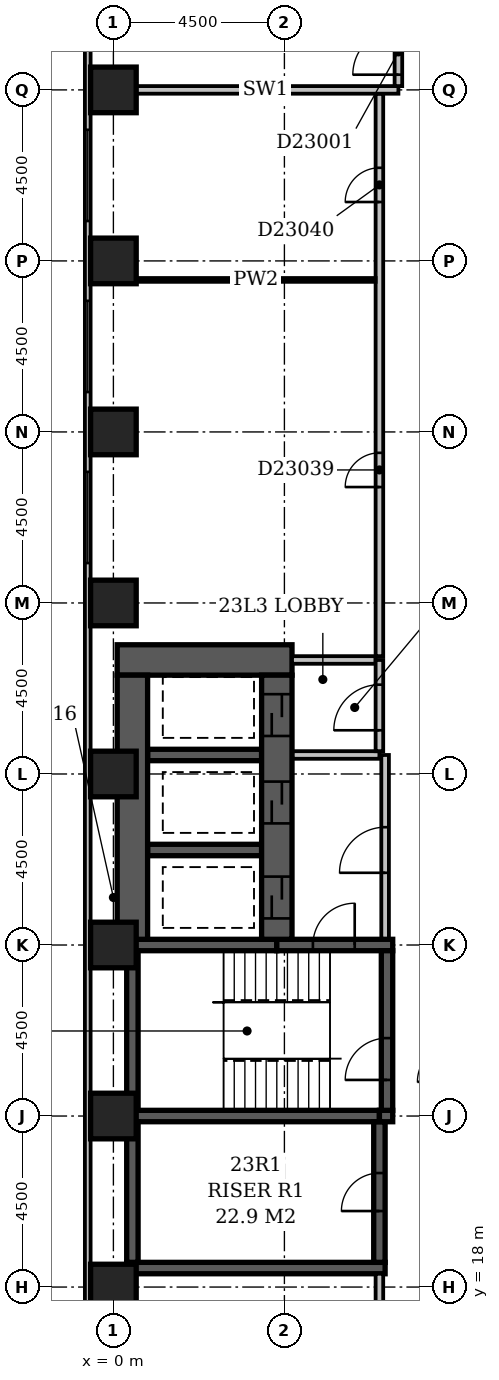
"""IFC4 building model, lengths in metres.
Left out: names, types, materials, properties, quantities, classifications, styles, units other than length and angle.
Written with IfcOpenShell. Run it as: python <this file> out.ifc"""

import sys

from ifc_helpers import new_model, si_unit, direction, frame, frame_2d, origin, origin_2d, place, context, subcontext, project, spatial, rectangle, extrude, element, fill, save


model = new_model("IFC4")
c1 = context("Model", 3, precision=1e-05, world=origin(), true_north=direction((0.0, 1.0)))
c2 = subcontext(c1, "Body", "Model", "MODEL_VIEW")
j1 = project(units=[si_unit("LENGTHUNIT", "METRE"), si_unit("PLANEANGLEUNIT", "RADIAN")], contexts=[c1])
p1 = place(None, origin())
s1 = spatial("IfcSite", under=j1, at=p1, CompositionType="ELEMENT")
p2 = place(p1, origin())
s2 = spatial("IfcBuilding", under=s1, at=p2, CompositionType="ELEMENT")
p3 = place(p2, frame((0.0, 0.0, 93.8)))
s3 = spatial("IfcBuildingStorey", under=s2, at=p3, CompositionType="ELEMENT", Elevation=93.8)
p4 = place(p3, frame((0.1, 34.5, -0.3), z_axis=(0.0, 0.0, 1.0), x_axis=(1.0, 0.0, 0.0)))
e1 = element("IfcWall", 1, at=p4, inside=s3, PredefinedType="SHEAR", context=c2, shape_type="SweptSolid", body=[
    extrude(rectangle(XDim=4.6, YDim=0.8, at=frame_2d((2.3, 0.0))), origin(), (0.0, 0.0, 1.0), 3.6),
])
p5 = place(p3, frame((0.35, 18.5, -0.3), z_axis=(0.0, 0.0, 1.0), x_axis=(1.0, 0.0, 0.0)))
e2 = element("IfcWall", 2, at=p5, inside=s3, PredefinedType="SHEAR", context=c2, shape_type="SweptSolid", body=[
    extrude(rectangle(XDim=6.8, YDim=0.3, at=frame_2d((3.4, 0.0))), origin(), (0.0, 0.0, 1.0), 3.6),
])
p6 = place(p3, frame((0.35, 22.5, -0.3), z_axis=(0.0, 0.0, 1.0), x_axis=(1.0, 0.0, 0.0)))
e3 = element("IfcWall", 3, at=p6, inside=s3, PredefinedType="SHEAR", context=c2, shape_type="SweptSolid", body=[
    extrude(rectangle(XDim=6.65, YDim=0.3, at=frame_2d((3.325, 0.0))), origin(), (0.0, 0.0, 1.0), 3.6),
])
p7 = place(p3, frame((0.35, 27.0, -0.3), z_axis=(0.0, 0.0, 1.0), x_axis=(1.0, 0.0, 0.0)))
e4 = element("IfcWall", 4, at=p7, inside=s3, PredefinedType="SHEAR", context=c2, shape_type="SweptSolid", body=[
    extrude(rectangle(XDim=3.95, YDim=0.3, at=frame_2d((1.975, 0.0))), origin(), (0.0, 0.0, 1.0), 3.6),
])
p8 = place(p3, frame((0.5, 18.65, -0.3), z_axis=(0.0, 0.0, 1.0), x_axis=(0.0, 1.0, 0.0)))
e5 = element("IfcWall", 5, at=p8, inside=s3, PredefinedType="SHEAR", context=c2, shape_type="SweptSolid", body=[
    extrude(rectangle(XDim=3.7, YDim=0.3, at=frame_2d((1.85, 0.0))), origin(), (0.0, 0.0, 1.0), 3.6),
])
p9 = place(p3, frame((0.5, 22.65, -0.3), z_axis=(0.0, 0.0, 1.0), x_axis=(0.0, 1.0, 0.0)))
e6 = element("IfcWall", 6, at=p9, inside=s3, PredefinedType="SHEAR", context=c2, shape_type="SweptSolid", body=[
    extrude(rectangle(XDim=4.2, YDim=0.3, at=frame_2d((2.1, 0.0))), origin(), (0.0, 0.0, 1.0), 3.6),
])
p10 = place(p3, frame((0.5, 27.15, -0.3), z_axis=(0.0, 0.0, 1.0), x_axis=(0.0, 1.0, 0.0)))
e7 = element("IfcWall", 7, at=p10, inside=s3, PredefinedType="SHEAR", context=c2, shape_type="SweptSolid", body=[
    extrude(rectangle(XDim=6.95, YDim=0.8, at=frame_2d((3.475, 0.0))), origin(), (0.0, 0.0, 1.0), 3.6),
])
for number, where, z_axis, x_axis in (
    (8, (0.9, 29.5, -0.3), (0.0, 0.0, 1.0), (1.0, 0.0, 0.0)),
    (9, (0.9, 32.0, -0.3), (0.0, 0.0, 1.0), (1.0, 0.0, 0.0)),
):
    element("IfcWall", number, at=place(p3, frame(where, z_axis=z_axis, x_axis=x_axis)), inside=s3, PredefinedType="SHEAR", context=c2, shape_type="SweptSolid", body=[
        extrude(rectangle(XDim=3.0, YDim=0.3, at=frame_2d((1.5, 0.0))), origin(), (0.0, 0.0, 1.0), 3.6),
    ])
p11 = place(p3, frame((4.3, 27.0, -0.3), z_axis=(0.0, 0.0, 1.0), x_axis=(1.0, 0.0, 0.0)))
e10 = element("IfcWall", 10, at=p11, inside=s3, PredefinedType="SHEAR", context=c2, shape_type="SweptSolid", body=[
    extrude(rectangle(XDim=3.05, YDim=0.3, at=frame_2d((1.525, 0.0))), origin(), (0.0, 0.0, 1.0), 3.6),
])
p12 = place(p11, frame((0.95, 0.0, 0.3)))
e11 = element("IfcOpeningElement", 11, at=p12, cuts=e10, PredefinedType="OPENING", context=c2, shape_type="SweptSolid", body=[
    extrude(rectangle(XDim=1.1, YDim=2.1, at=frame_2d((0.55, 1.05))), frame((0.0, 0.162, 0.0), z_axis=(0.0, -1.0, 0.0), x_axis=(1.0, 0.0, 0.0)), (0.0, 0.0, 1.0), 0.324),
])
p13 = place(p3, frame((4.3, 27.15, -0.3), z_axis=(0.0, 0.0, 1.0), x_axis=(0.0, 1.0, 0.0)))
e12 = element("IfcWall", 12, at=p13, inside=s3, PredefinedType="SHEAR", context=c2, shape_type="SweptSolid", body=[
    extrude(rectangle(XDim=6.95, YDim=0.8, at=frame_2d((3.475, 0.0))), origin(), (0.0, 0.0, 1.0), 3.6),
])
p14 = place(p13, frame((3.05, 0.0, 0.3)))
e13 = element("IfcOpeningElement", 13, at=p14, cuts=e12, PredefinedType="OPENING", context=c2, shape_type="SweptSolid", body=[
    extrude(rectangle(XDim=1.1, YDim=2.1, at=frame_2d((0.55, 1.05))), frame((0.0, 0.412, 0.0), z_axis=(0.0, -1.0, 0.0), x_axis=(1.0, 0.0, 0.0)), (0.0, 0.0, 1.0), 0.824),
])
p15 = place(p13, frame((0.55, 0.0, 0.3)))
e14 = element("IfcOpeningElement", 14, at=p15, cuts=e12, PredefinedType="OPENING", context=c2, shape_type="SweptSolid", body=[
    extrude(rectangle(XDim=1.1, YDim=2.1, at=frame_2d((0.55, 1.05))), frame((0.0, 0.412, 0.0), z_axis=(0.0, -1.0, 0.0), x_axis=(1.0, 0.0, 0.0)), (0.0, 0.0, 1.0), 0.824),
])
p16 = place(p13, frame((5.35, 0.0, 0.3)))
e15 = element("IfcOpeningElement", 15, at=p16, cuts=e12, PredefinedType="OPENING", context=c2, shape_type="SweptSolid", body=[
    extrude(rectangle(XDim=1.1, YDim=2.1, at=frame_2d((0.55, 1.05))), frame((0.0, 0.412, 0.0), z_axis=(0.0, -1.0, 0.0), x_axis=(1.0, 0.0, 0.0)), (0.0, 0.0, 1.0), 0.824),
])
p17 = place(p3, frame((7.0, 18.65, -0.3), z_axis=(0.0, 0.0, 1.0), x_axis=(0.0, 1.0, 0.0)))
e16 = element("IfcWall", 16, at=p17, inside=s3, PredefinedType="SHEAR", context=c2, shape_type="SweptSolid", body=[
    extrude(rectangle(XDim=3.7, YDim=0.3, at=frame_2d((1.85, 0.0))), origin(), (0.0, 0.0, 1.0), 3.6),
])
p18 = place(p17, frame((1.35, 0.0, 0.3)))
e17 = element("IfcOpeningElement", 17, at=p18, cuts=e16, PredefinedType="OPENING", context=c2, shape_type="SweptSolid", body=[
    extrude(rectangle(XDim=1.0, YDim=2.1, at=frame_2d((0.5, 1.05))), frame((0.0, 0.162, 0.0), z_axis=(0.0, -1.0, 0.0), x_axis=(1.0, 0.0, 0.0)), (0.0, 0.0, 1.0), 0.324),
])
p19 = place(p3, frame((7.0, 22.5, -0.3), z_axis=(0.0, 0.0, 1.0), x_axis=(1.0, 0.0, 0.0)))
e18 = element("IfcWall", 18, at=p19, inside=s3, PredefinedType="SHEAR", context=c2, shape_type="SweptSolid", body=[
    extrude(rectangle(XDim=0.35, YDim=0.3, at=frame_2d((0.175, 0.0))), origin(), (0.0, 0.0, 1.0), 3.6),
])
p20 = place(p3, frame((7.2, 22.65, -0.3), z_axis=(0.0, 0.0, 1.0), x_axis=(0.0, 1.0, 0.0)))
e19 = element("IfcWall", 19, at=p20, inside=s3, PredefinedType="SHEAR", context=c2, shape_type="SweptSolid", body=[
    extrude(rectangle(XDim=4.2, YDim=0.3, at=frame_2d((2.1, 0.0))), origin(), (0.0, 0.0, 1.0), 3.6),
])
p21 = place(p20, frame((0.8, 0.0, 0.3)))
e20 = element("IfcOpeningElement", 20, at=p21, cuts=e19, PredefinedType="OPENING", context=c2, shape_type="SweptSolid", body=[
    extrude(rectangle(XDim=1.1, YDim=2.1, at=frame_2d((0.55, 1.05))), frame((0.0, 0.162, 0.0), z_axis=(0.0, -1.0, 0.0), x_axis=(1.0, 0.0, 0.0)), (0.0, 0.0, 1.0), 0.324),
])
for number, where, z_axis, x_axis in (
    (21, (0.0, 18.0, -0.3), (0.0, 0.0, 1.0), (1.0, 0.0, 0.0)),
    (22, (0.0, 22.5, -0.3), (0.0, 0.0, 1.0), (1.0, 0.0, 0.0)),
    (23, (0.0, 27.0, -0.3), (0.0, 0.0, 1.0), (1.0, 0.0, 0.0)),
    (24, (0.0, 31.5, -0.3), (0.0, 0.0, 1.0), (1.0, 0.0, 0.0)),
    (25, (0.0, 36.0, -0.3), (0.0, 0.0, 1.0), (1.0, 0.0, 0.0)),
    (26, (0.0, 40.5, -0.3), (0.0, 0.0, 1.0), (1.0, 0.0, 0.0)),
    (27, (0.0, 45.0, -0.3), (0.0, 0.0, 1.0), (1.0, 0.0, 0.0)),
    (28, (0.0, 49.5, -0.3), (0.0, 0.0, 1.0), (1.0, 0.0, 0.0)),
):
    element("IfcColumn", number, at=place(p3, frame(where, z_axis=z_axis, x_axis=x_axis)), inside=s3, PredefinedType="COLUMN", context=c2, shape_type="SweptSolid", body=[
        extrude(rectangle(XDim=1.2, YDim=1.2, at=origin_2d()), origin(), (0.0, 0.0, 1.0), 3.6),
    ])
p22 = place(p3, frame((-0.675, 59.1, 0.0), z_axis=(0.0, 0.0, 1.0), x_axis=(0.0, -1.0, 0.0)))
e29 = element("IfcWall", 29, at=p22, inside=s3, PredefinedType="STANDARD", context=c2, shape_type="SweptSolid", body=[
    extrude(rectangle(XDim=55.35, YDim=0.15, at=frame_2d((27.675, 0.0))), origin(), (0.0, 0.0, 1.0), 2.7),
])
p23 = place(p22, frame((10.65, 0.0, 0.6)))
e30 = element("IfcOpeningElement", 30, at=p23, cuts=e29, PredefinedType="OPENING", context=c2, shape_type="SweptSolid", body=[
    extrude(rectangle(XDim=2.4, YDim=1.8, at=frame_2d((1.2, 0.9))), frame((0.0, 0.087, 0.0), z_axis=(0.0, -1.0, 0.0), x_axis=(1.0, 0.0, 0.0)), (0.0, 0.0, 1.0), 0.174),
])
p24 = place(p22, frame((15.15, 0.0, 0.6)))
e31 = element("IfcOpeningElement", 31, at=p24, cuts=e29, PredefinedType="OPENING", context=c2, shape_type="SweptSolid", body=[
    extrude(rectangle(XDim=2.4, YDim=1.8, at=frame_2d((1.2, 0.9))), frame((0.0, 0.087, 0.0), z_axis=(0.0, -1.0, 0.0), x_axis=(1.0, 0.0, 0.0)), (0.0, 0.0, 1.0), 0.174),
])
p25 = place(p22, frame((19.65, 0.0, 0.6)))
e32 = element("IfcOpeningElement", 32, at=p25, cuts=e29, PredefinedType="OPENING", context=c2, shape_type="SweptSolid", body=[
    extrude(rectangle(XDim=2.4, YDim=1.8, at=frame_2d((1.2, 0.9))), frame((0.0, 0.087, 0.0), z_axis=(0.0, -1.0, 0.0), x_axis=(1.0, 0.0, 0.0)), (0.0, 0.0, 1.0), 0.174),
])
p26 = place(p22, frame((42.15, 0.0, 0.6)))
e33 = element("IfcOpeningElement", 33, at=p26, cuts=e29, PredefinedType="OPENING", context=c2, shape_type="SweptSolid", body=[
    extrude(rectangle(XDim=2.4, YDim=1.8, at=frame_2d((1.2, 0.9))), frame((0.0, 0.087, 0.0), z_axis=(0.0, -1.0, 0.0), x_axis=(1.0, 0.0, 0.0)), (0.0, 0.0, 1.0), 0.174),
])
p27 = place(p3, frame((4.72, 32.0, 0.0), z_axis=(0.0, 0.0, 1.0), x_axis=(1.0, 0.0, 0.0)))
e34 = element("IfcWall", 34, at=p27, inside=s3, PredefinedType="PARTITIONING", context=c2, shape_type="SweptSolid", body=[
    extrude(rectangle(XDim=2.28, YDim=0.2, at=frame_2d((1.14, 0.0))), origin(), (0.0, 0.0, 1.0), 3.3),
])
p28 = place(p3, frame((7.0, 32.1, 0.0), z_axis=(0.0, 0.0, 1.0), x_axis=(0.0, 1.0, 0.0)))
e35 = element("IfcWall", 35, at=p28, inside=s3, PredefinedType="PARTITIONING", context=c2, shape_type="SweptSolid", body=[
    extrude(rectangle(XDim=2.4, YDim=0.2, at=frame_2d((1.2, 0.0))), origin(), (0.0, 0.0, 1.0), 3.3),
])
p29 = place(p28, frame((0.55, 0.0, 0.0)))
e36 = element("IfcOpeningElement", 36, at=p29, cuts=e35, PredefinedType="OPENING", context=c2, shape_type="SweptSolid", body=[
    extrude(rectangle(XDim=1.2, YDim=2.1, at=frame_2d((0.6, 1.05))), frame((0.0, 0.112, 0.0), z_axis=(0.0, -1.0, 0.0), x_axis=(1.0, 0.0, 0.0)), (0.0, 0.0, 1.0), 0.224),
])
p30 = place(p3, frame((4.7, 34.5, 0.0), z_axis=(0.0, 0.0, 1.0), x_axis=(1.0, 0.0, 0.0)))
e37 = element("IfcWall", 37, at=p30, inside=s3, PredefinedType="PARTITIONING", context=c2, shape_type="SweptSolid", body=[
    extrude(rectangle(XDim=2.2, YDim=0.2, at=frame_2d((1.1, 0.0))), origin(), (0.0, 0.0, 1.0), 3.3),
])
p31 = place(p3, frame((7.15, 27.17, 0.0), z_axis=(0.0, 0.0, 1.0), x_axis=(0.0, 1.0, 0.0)))
e38 = element("IfcWall", 38, at=p31, inside=s3, PredefinedType="PARTITIONING", context=c2, shape_type="SweptSolid", body=[
    extrude(rectangle(XDim=4.83, YDim=0.2, at=frame_2d((2.415, 0.0))), origin(), (0.0, 0.0, 1.0), 3.3),
])
p32 = place(p31, frame((1.73, 0.0, 0.0)))
e39 = element("IfcOpeningElement", 39, at=p32, cuts=e38, PredefinedType="OPENING", context=c2, shape_type="SweptSolid", body=[
    extrude(rectangle(XDim=1.2, YDim=2.1, at=frame_2d((0.6, 1.05))), frame((0.0, 0.112, 0.0), z_axis=(0.0, -1.0, 0.0), x_axis=(1.0, 0.0, 0.0)), (0.0, 0.0, 1.0), 0.224),
])
p33 = place(p3, frame((0.5, 49.5, 0.0), z_axis=(0.0, 0.0, 1.0), x_axis=(1.0, 0.0, 0.0)))
e40 = element("IfcWall", 40, at=p33, inside=s3, PredefinedType="PARTITIONING", context=c2, shape_type="SweptSolid", body=[
    extrude(rectangle(XDim=7.0, YDim=0.2, at=frame_2d((3.5, 0.0))), origin(), (0.0, 0.0, 1.0), 3.3),
])
p34 = place(p3, frame((7.5, 49.6, 0.0), z_axis=(0.0, 0.0, 1.0), x_axis=(0.0, 1.0, 0.0)))
e41 = element("IfcWall", 41, at=p34, inside=s3, PredefinedType="PARTITIONING", context=c2, shape_type="SweptSolid", body=[
    extrude(rectangle(XDim=3.9, YDim=0.2, at=frame_2d((1.95, 0.0))), origin(), (0.0, 0.0, 1.0), 3.3),
])
p35 = place(p34, frame((0.3, 0.0, 0.0)))
e42 = element("IfcOpeningElement", 42, at=p35, cuts=e41, PredefinedType="OPENING", context=c2, shape_type="SweptSolid", body=[
    extrude(rectangle(XDim=1.2, YDim=2.1, at=frame_2d((0.6, 1.05))), frame((0.0, 0.112, 0.0), z_axis=(0.0, -1.0, 0.0), x_axis=(1.0, 0.0, 0.0)), (0.0, 0.0, 1.0), 0.224),
])
p36 = place(p3, frame((7.0, 14.15, 0.0), z_axis=(0.0, 0.0, 1.0), x_axis=(0.0, 1.0, 0.0)))
e43 = element("IfcWall", 43, at=p36, inside=s3, PredefinedType="PARTITIONING", context=c2, shape_type="SweptSolid", body=[
    extrude(rectangle(XDim=4.2, YDim=0.2, at=frame_2d((2.1, 0.0))), origin(), (0.0, 0.0, 1.0), 3.3),
])
p37 = place(p36, frame((1.65, 0.0, 0.0)))
e44 = element("IfcOpeningElement", 44, at=p37, cuts=e43, PredefinedType="OPENING", context=c2, shape_type="SweptSolid", body=[
    extrude(rectangle(XDim=0.9, YDim=2.1, at=frame_2d((0.45, 1.05))), frame((0.0, 0.112, 0.0), z_axis=(0.0, -1.0, 0.0), x_axis=(1.0, 0.0, 0.0)), (0.0, 0.0, 1.0), 0.224),
])
p38 = place(p3, frame((7.0, 34.6, 0.0), z_axis=(0.0, 0.0, 1.0), x_axis=(0.0, 1.0, 0.0)))
e45 = element("IfcWall", 45, at=p38, inside=s3, PredefinedType="PARTITIONING", context=c2, shape_type="SweptSolid", body=[
    extrude(rectangle(XDim=14.8, YDim=0.2, at=frame_2d((7.4, 0.0))), origin(), (0.0, 0.0, 1.0), 3.3),
])
p39 = place(p38, frame((4.45, 0.0, 0.0)))
e46 = element("IfcOpeningElement", 46, at=p39, cuts=e45, PredefinedType="OPENING", context=c2, shape_type="SweptSolid", body=[
    extrude(rectangle(XDim=0.9, YDim=2.1, at=frame_2d((0.45, 1.05))), frame((0.0, 0.112, 0.0), z_axis=(0.0, -1.0, 0.0), x_axis=(1.0, 0.0, 0.0)), (0.0, 0.0, 1.0), 0.224),
])
p40 = place(p38, frame((11.95, 0.0, 0.0)))
e47 = element("IfcOpeningElement", 47, at=p40, cuts=e45, PredefinedType="OPENING", context=c2, shape_type="SweptSolid", body=[
    extrude(rectangle(XDim=0.9, YDim=2.1, at=frame_2d((0.45, 1.05))), frame((0.0, 0.112, 0.0), z_axis=(0.0, -1.0, 0.0), x_axis=(1.0, 0.0, 0.0)), (0.0, 0.0, 1.0), 0.224),
])
p41 = place(p3, frame((0.6, 44.5, 0.0), z_axis=(0.0, 0.0, 1.0), x_axis=(1.0, 0.0, 0.0)))
e48 = element("IfcWall", 48, at=p41, inside=s3, PredefinedType="PARTITIONING", context=c2, shape_type="SweptSolid", body=[
    extrude(rectangle(XDim=6.3, YDim=0.1, at=frame_2d((3.15, 0.0))), origin(), (0.0, 0.0, 1.0), 3.3),
])
p42 = place(p23, origin())
e49 = element("IfcWindow", 49, at=p42, inside=s3, PartitioningType="SINGLE_PANEL", PredefinedType="WINDOW", context=c2, shape_type="SweptSolid", body=[
    extrude(rectangle(XDim=2.4, YDim=1.8, at=frame_2d((1.2, 0.9))), frame((0.0, 0.03, 0.0), z_axis=(0.0, -1.0, 0.0), x_axis=(1.0, 0.0, 0.0)), (0.0, 0.0, 1.0), 0.06),
])
fill(e30, e49)
p43 = place(p24, origin())
e50 = element("IfcWindow", 50, at=p43, inside=s3, PartitioningType="SINGLE_PANEL", PredefinedType="WINDOW", context=c2, shape_type="SweptSolid", body=[
    extrude(rectangle(XDim=2.4, YDim=1.8, at=frame_2d((1.2, 0.9))), frame((0.0, 0.03, 0.0), z_axis=(0.0, -1.0, 0.0), x_axis=(1.0, 0.0, 0.0)), (0.0, 0.0, 1.0), 0.06),
])
fill(e31, e50)
p44 = place(p25, origin())
e51 = element("IfcWindow", 51, at=p44, inside=s3, PartitioningType="SINGLE_PANEL", PredefinedType="WINDOW", context=c2, shape_type="SweptSolid", body=[
    extrude(rectangle(XDim=2.4, YDim=1.8, at=frame_2d((1.2, 0.9))), frame((0.0, 0.03, 0.0), z_axis=(0.0, -1.0, 0.0), x_axis=(1.0, 0.0, 0.0)), (0.0, 0.0, 1.0), 0.06),
])
fill(e32, e51)
p45 = place(p35, origin())
e52 = element("IfcDoor", 52, at=p45, inside=s3, OperationType="SINGLE_SWING_LEFT", PredefinedType="DOOR", context=c2, shape_type="SweptSolid", body=[
    extrude(rectangle(XDim=1.2, YDim=2.1, at=frame_2d((0.6, 1.05))), frame((0.0, 0.025, 0.0), z_axis=(0.0, -1.0, 0.0), x_axis=(1.0, 0.0, 0.0)), (0.0, 0.0, 1.0), 0.05),
])
fill(e42, e52)
p46 = place(p32, origin())
e53 = element("IfcDoor", 53, at=p46, inside=s3, OperationType="SINGLE_SWING_LEFT", PredefinedType="DOOR", context=c2, shape_type="SweptSolid", body=[
    extrude(rectangle(XDim=1.2, YDim=2.1, at=frame_2d((0.6, 1.05))), frame((0.0, 0.025, 0.0), z_axis=(0.0, -1.0, 0.0), x_axis=(1.0, 0.0, 0.0)), (0.0, 0.0, 1.0), 0.05),
])
fill(e39, e53)
p47 = place(p14, origin())
e54 = element("IfcDoor", 54, at=p47, inside=s3, OperationType="SLIDING_TO_LEFT", PredefinedType="DOOR", context=c2, shape_type="SweptSolid", body=[
    extrude(rectangle(XDim=1.1, YDim=2.1, at=frame_2d((0.55, 1.05))), frame((0.0, 0.025, 0.0), z_axis=(0.0, -1.0, 0.0), x_axis=(1.0, 0.0, 0.0)), (0.0, 0.0, 1.0), 0.05),
])
fill(e13, e54)
p48 = place(p15, origin())
e55 = element("IfcDoor", 55, at=p48, inside=s3, OperationType="SLIDING_TO_LEFT", PredefinedType="DOOR", context=c2, shape_type="SweptSolid", body=[
    extrude(rectangle(XDim=1.1, YDim=2.1, at=frame_2d((0.55, 1.05))), frame((0.0, 0.025, 0.0), z_axis=(0.0, -1.0, 0.0), x_axis=(1.0, 0.0, 0.0)), (0.0, 0.0, 1.0), 0.05),
])
fill(e14, e55)
p49 = place(p29, origin())
e56 = element("IfcDoor", 56, at=p49, inside=s3, OperationType="SINGLE_SWING_LEFT", PredefinedType="DOOR", context=c2, shape_type="SweptSolid", body=[
    extrude(rectangle(XDim=1.2, YDim=2.1, at=frame_2d((0.6, 1.05))), frame((0.0, 0.025, 0.0), z_axis=(0.0, -1.0, 0.0), x_axis=(1.0, 0.0, 0.0)), (0.0, 0.0, 1.0), 0.05),
])
fill(e36, e56)
p50 = place(p16, origin())
e57 = element("IfcDoor", 57, at=p50, inside=s3, OperationType="SLIDING_TO_LEFT", PredefinedType="DOOR", context=c2, shape_type="SweptSolid", body=[
    extrude(rectangle(XDim=1.1, YDim=2.1, at=frame_2d((0.55, 1.05))), frame((0.0, 0.025, 0.0), z_axis=(0.0, -1.0, 0.0), x_axis=(1.0, 0.0, 0.0)), (0.0, 0.0, 1.0), 0.05),
])
fill(e15, e57)
p51 = place(p18, origin())
e58 = element("IfcDoor", 58, at=p51, inside=s3, OperationType="SINGLE_SWING_LEFT", PredefinedType="DOOR", context=c2, shape_type="SweptSolid", body=[
    extrude(rectangle(XDim=1.0, YDim=2.1, at=frame_2d((0.5, 1.05))), frame((0.0, 0.025, 0.0), z_axis=(0.0, -1.0, 0.0), x_axis=(1.0, 0.0, 0.0)), (0.0, 0.0, 1.0), 0.05),
])
fill(e17, e58)
p52 = place(p12, frame((1.1, 0.0, 0.0), z_axis=(0.0, 0.0, 1.0), x_axis=(-1.0, 0.0, 0.0)))
e59 = element("IfcDoor", 59, at=p52, inside=s3, OperationType="SINGLE_SWING_LEFT", PredefinedType="DOOR", context=c2, shape_type="SweptSolid", body=[
    extrude(rectangle(XDim=1.1, YDim=2.1, at=frame_2d((0.55, 1.05))), frame((0.0, 0.025, 0.0), z_axis=(0.0, -1.0, 0.0), x_axis=(1.0, 0.0, 0.0)), (0.0, 0.0, 1.0), 0.05),
])
fill(e11, e59)
p53 = place(p21, origin())
e60 = element("IfcDoor", 60, at=p53, inside=s3, OperationType="SINGLE_SWING_LEFT", PredefinedType="DOOR", context=c2, shape_type="SweptSolid", body=[
    extrude(rectangle(XDim=1.1, YDim=2.1, at=frame_2d((0.55, 1.05))), frame((0.0, 0.025, 0.0), z_axis=(0.0, -1.0, 0.0), x_axis=(1.0, 0.0, 0.0)), (0.0, 0.0, 1.0), 0.05),
])
fill(e20, e60)
p54 = place(p39, origin())
e61 = element("IfcDoor", 61, at=p54, inside=s3, OperationType="SINGLE_SWING_LEFT", PredefinedType="DOOR", context=c2, shape_type="SweptSolid", body=[
    extrude(rectangle(XDim=0.9, YDim=2.1, at=frame_2d((0.45, 1.05))), frame((0.0, 0.025, 0.0), z_axis=(0.0, -1.0, 0.0), x_axis=(1.0, 0.0, 0.0)), (0.0, 0.0, 1.0), 0.05),
])
fill(e46, e61)
p55 = place(p40, origin())
e62 = element("IfcDoor", 62, at=p55, inside=s3, OperationType="SINGLE_SWING_LEFT", PredefinedType="DOOR", context=c2, shape_type="SweptSolid", body=[
    extrude(rectangle(XDim=0.9, YDim=2.1, at=frame_2d((0.45, 1.05))), frame((0.0, 0.025, 0.0), z_axis=(0.0, -1.0, 0.0), x_axis=(1.0, 0.0, 0.0)), (0.0, 0.0, 1.0), 0.05),
])
fill(e47, e62)
save(model, sys.argv[1])
